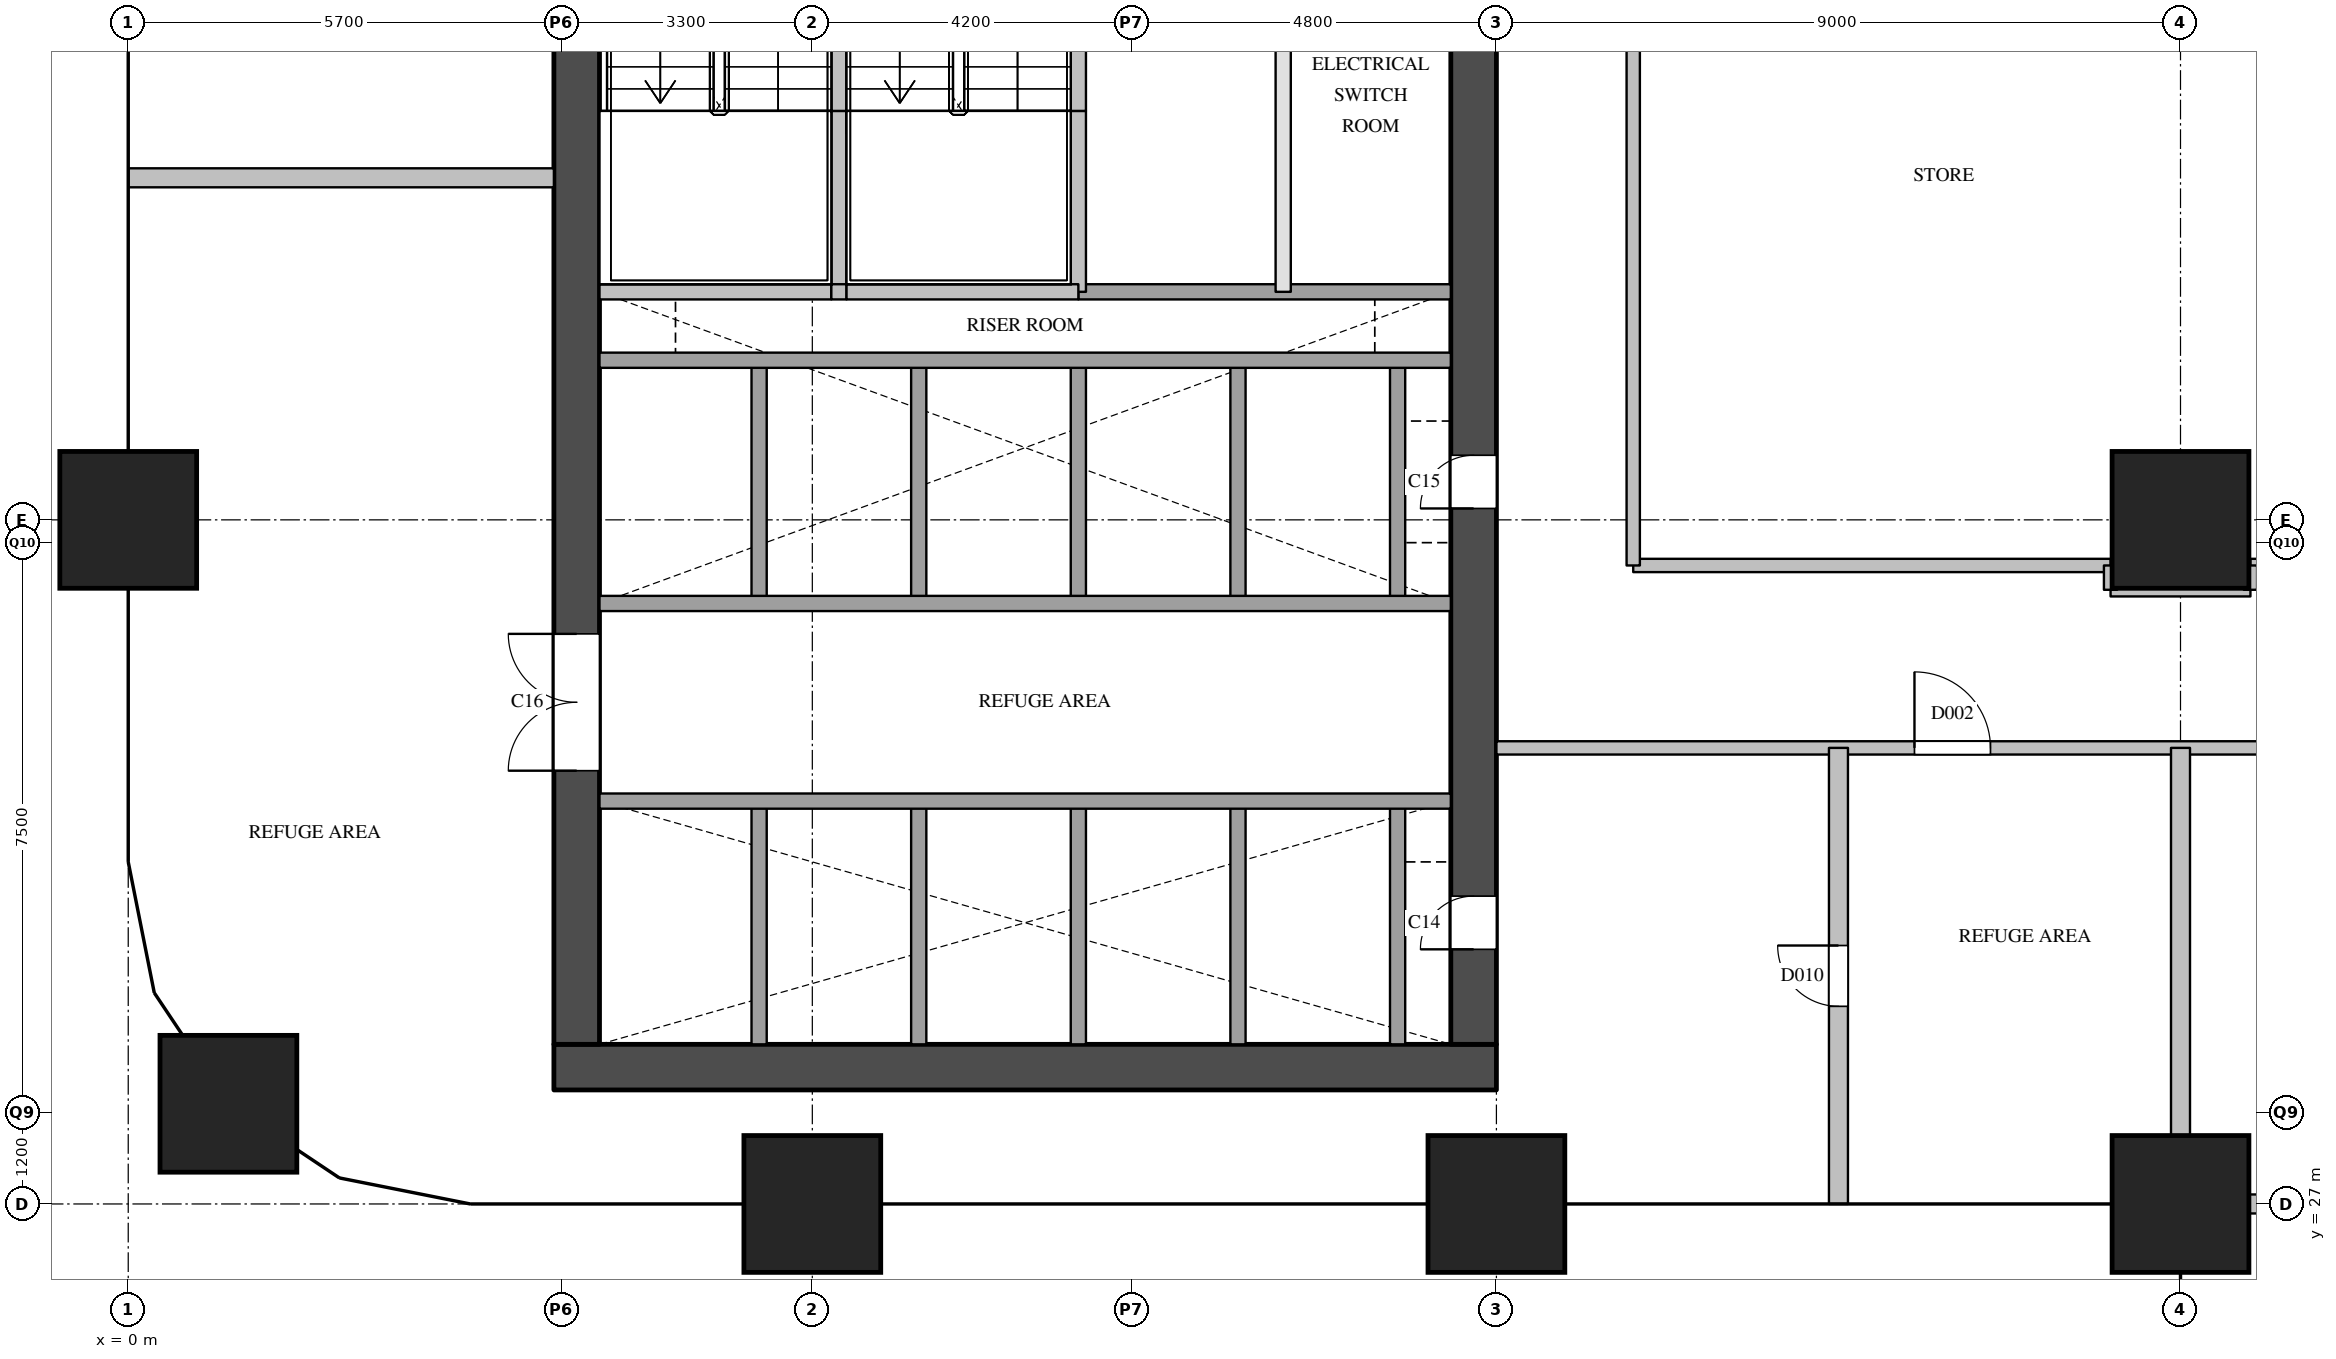
"""IFC4 building model, lengths in metres.
Left out: names, types, materials, properties, quantities, classifications, styles, units other than length and angle.
Written with IfcOpenShell. Run it as: python <this file> out.ifc"""

import sys

from ifc_helpers import new_model, si_unit, direction, frame, frame_2d, origin, origin_2d, place, context, subcontext, project, spatial, rectangle, extrude, element, fill, save


model = new_model("IFC4")
c1 = context("Model", 3, precision=1e-05, world=origin(), true_north=direction((0.0, 1.0)))
c2 = subcontext(c1, "Body", "Model", "MODEL_VIEW")
j1 = project(units=[si_unit("LENGTHUNIT", "METRE"), si_unit("PLANEANGLEUNIT", "RADIAN")], contexts=[c1])
p1 = place(None, origin())
s1 = spatial("IfcSite", under=j1, at=p1, CompositionType="ELEMENT")
p2 = place(p1, origin())
s2 = spatial("IfcBuilding", under=s1, at=p2, CompositionType="ELEMENT")
p3 = place(p2, frame((0.0, 0.0, 123.4)))
s3 = spatial("IfcBuildingStorey", under=s2, at=p3, CompositionType="ELEMENT", Elevation=123.4)
for number, where, z_axis, x_axis in (
    (1, (1.318, 28.318, 0.0), (0.0, 0.0, 1.0), (1.0, 0.0, 0.0)),
    (2, (0.0, 36.0, 0.0), (0.0, 0.0, 1.0), (1.0, 0.0, 0.0)),
    (3, (9.0, 27.0, 0.0), (0.0, 0.0, 1.0), (1.0, 0.0, 0.0)),
    (4, (18.0, 27.0, 0.0), (0.0, 0.0, 1.0), (1.0, 0.0, 0.0)),
    (5, (27.0, 27.0, 0.0), (0.0, 0.0, 1.0), (1.0, 0.0, 0.0)),
    (6, (27.0, 36.0, 0.0), (0.0, 0.0, 1.0), (1.0, 0.0, 0.0)),
):
    element("IfcColumn", number, at=place(p3, frame(where, z_axis=z_axis, x_axis=x_axis)), inside=s3, PredefinedType="COLUMN", context=c2, shape_type="SweptSolid", body=[
        extrude(rectangle(XDim=1.8, YDim=1.8, at=origin_2d()), origin(), (0.0, 0.0, 1.0), 6.0),
    ])
p4 = place(p3, frame((5.6, 28.8, 0.0), z_axis=(0.0, 0.0, 1.0), x_axis=(1.0, 0.0, 0.0)))
e7 = element("IfcWall", 7, at=p4, inside=s3, PredefinedType="SHEAR", context=c2, shape_type="SweptSolid", body=[
    extrude(rectangle(XDim=12.4, YDim=0.6, at=frame_2d((6.2, 0.0))), origin(), (0.0, 0.0, 1.0), 5.7),
])
p5 = place(p3, frame((5.9, 29.1, 0.0), z_axis=(0.0, 0.0, 1.0), x_axis=(0.0, 1.0, 0.0)))
e8 = element("IfcWall", 8, at=p5, inside=s3, PredefinedType="SHEAR", context=c2, shape_type="SweptSolid", body=[
    extrude(rectangle(XDim=20.3, YDim=0.6, at=frame_2d((10.15, 0.0))), origin(), (0.0, 0.0, 1.0), 5.7),
])
p6 = place(p5, frame((3.6, 0.0, 0.0)))
e9 = element("IfcOpeningElement", 9, at=p6, cuts=e8, PredefinedType="OPENING", context=c2, shape_type="SweptSolid", body=[
    extrude(rectangle(XDim=1.8, YDim=2.1, at=frame_2d((0.9, 1.05))), frame((0.0, 0.31, 0.0), z_axis=(0.0, -1.0, 0.0), x_axis=(1.0, 0.0, 0.0)), (0.0, 0.0, 1.0), 0.62),
])
p7 = place(p3, frame((17.7, 29.1, 0.0), z_axis=(0.0, 0.0, 1.0), x_axis=(0.0, 1.0, 0.0)))
e10 = element("IfcWall", 10, at=p7, inside=s3, PredefinedType="SHEAR", context=c2, shape_type="SweptSolid", body=[
    extrude(rectangle(XDim=20.3, YDim=0.6, at=frame_2d((10.15, 0.0))), origin(), (0.0, 0.0, 1.0), 5.7),
])
p8 = place(p7, frame((1.25, 0.0, 0.0)))
e11 = element("IfcOpeningElement", 11, at=p8, cuts=e10, PredefinedType="OPENING", context=c2, shape_type="SweptSolid", body=[
    extrude(rectangle(XDim=0.7, YDim=2.1, at=frame_2d((0.35, 1.05))), frame((0.0, 0.31, 0.0), z_axis=(0.0, -1.0, 0.0), x_axis=(1.0, 0.0, 0.0)), (0.0, 0.0, 1.0), 0.62),
])
p9 = place(p7, frame((7.05, 0.0, 0.0)))
e12 = element("IfcOpeningElement", 12, at=p9, cuts=e10, PredefinedType="OPENING", context=c2, shape_type="SweptSolid", body=[
    extrude(rectangle(XDim=0.7, YDim=2.1, at=frame_2d((0.35, 1.05))), frame((0.0, 0.31, 0.0), z_axis=(0.0, -1.0, 0.0), x_axis=(1.0, 0.0, 0.0)), (0.0, 0.0, 1.0), 0.62),
])
p10 = place(p7, frame((16.4, 0.0, 0.0)))
e13 = element("IfcOpeningElement", 13, at=p10, cuts=e10, PredefinedType="OPENING", context=c2, shape_type="SweptSolid", body=[
    extrude(rectangle(XDim=1.0, YDim=2.1, at=frame_2d((0.5, 1.05))), frame((0.0, 0.31, 0.0), z_axis=(0.0, -1.0, 0.0), x_axis=(1.0, 0.0, 0.0)), (0.0, 0.0, 1.0), 0.62),
])
p11 = place(p3, frame((8.3, 29.1, 0.0), z_axis=(0.0, 0.0, 1.0), x_axis=(0.0, 1.0, 0.0)))
e14 = element("IfcWall", 14, at=p11, inside=s3, PredefinedType="SOLIDWALL", context=c2, shape_type="SweptSolid", body=[
    extrude(rectangle(XDim=3.2, YDim=0.2, at=frame_2d((1.6, 0.0))), origin(), (0.0, 0.0, 1.0), 5.7),
])
p12 = place(p3, frame((8.3, 34.9, 0.0), z_axis=(0.0, 0.0, 1.0), x_axis=(0.0, 1.0, 0.0)))
e15 = element("IfcWall", 15, at=p12, inside=s3, PredefinedType="SOLIDWALL", context=c2, shape_type="SweptSolid", body=[
    extrude(rectangle(XDim=3.2, YDim=0.2, at=frame_2d((1.6, 0.0))), origin(), (0.0, 0.0, 1.0), 5.7),
])
p13 = place(p3, frame((9.35, 39.0, 0.0), z_axis=(0.0, 0.0, 1.0), x_axis=(0.0, 1.0, 0.0)))
e16 = element("IfcWall", 16, at=p13, inside=s3, PredefinedType="SOLIDWALL", context=c2, shape_type="SweptSolid", body=[
    extrude(rectangle(XDim=2.38, YDim=0.2, at=frame_2d((1.19, 0.0))), origin(), (0.0, 0.0, 1.0), 5.7),
])
p14 = place(p3, frame((9.35, 41.38, 0.0), z_axis=(0.0, 0.0, 1.0), x_axis=(0.0, 1.0, 0.0)))
e17 = element("IfcWall", 17, at=p14, inside=s3, PredefinedType="SOLIDWALL", context=c2, shape_type="SweptSolid", body=[
    extrude(rectangle(XDim=2.32, YDim=0.2, at=frame_2d((1.16, 0.0))), origin(), (0.0, 0.0, 1.0), 5.7),
])
p15 = place(p3, frame((10.4, 29.1, 0.0), z_axis=(0.0, 0.0, 1.0), x_axis=(0.0, 1.0, 0.0)))
e18 = element("IfcWall", 18, at=p15, inside=s3, PredefinedType="SOLIDWALL", context=c2, shape_type="SweptSolid", body=[
    extrude(rectangle(XDim=3.2, YDim=0.2, at=frame_2d((1.6, 0.0))), origin(), (0.0, 0.0, 1.0), 5.7),
])
p16 = place(p3, frame((10.4, 34.9, 0.0), z_axis=(0.0, 0.0, 1.0), x_axis=(0.0, 1.0, 0.0)))
e19 = element("IfcWall", 19, at=p16, inside=s3, PredefinedType="SOLIDWALL", context=c2, shape_type="SweptSolid", body=[
    extrude(rectangle(XDim=3.2, YDim=0.2, at=frame_2d((1.6, 0.0))), origin(), (0.0, 0.0, 1.0), 5.7),
])
p17 = place(p3, frame((12.5, 29.1, 0.0), z_axis=(0.0, 0.0, 1.0), x_axis=(0.0, 1.0, 0.0)))
e20 = element("IfcWall", 20, at=p17, inside=s3, PredefinedType="SOLIDWALL", context=c2, shape_type="SweptSolid", body=[
    extrude(rectangle(XDim=3.2, YDim=0.2, at=frame_2d((1.6, 0.0))), origin(), (0.0, 0.0, 1.0), 5.7),
])
p18 = place(p3, frame((12.5, 34.9, 0.0), z_axis=(0.0, 0.0, 1.0), x_axis=(0.0, 1.0, 0.0)))
e21 = element("IfcWall", 21, at=p18, inside=s3, PredefinedType="SOLIDWALL", context=c2, shape_type="SweptSolid", body=[
    extrude(rectangle(XDim=3.2, YDim=0.2, at=frame_2d((1.6, 0.0))), origin(), (0.0, 0.0, 1.0), 5.7),
])
p19 = place(p3, frame((12.5, 39.0, 0.0), z_axis=(0.0, 0.0, 1.0), x_axis=(0.0, 1.0, 0.0)))
e22 = element("IfcWall", 22, at=p19, inside=s3, PredefinedType="SOLIDWALL", context=c2, shape_type="SweptSolid", body=[
    extrude(rectangle(XDim=2.38, YDim=0.2, at=frame_2d((1.19, 0.0))), origin(), (0.0, 0.0, 1.0), 5.7),
])
p20 = place(p3, frame((12.5, 41.38, 0.0), z_axis=(0.0, 0.0, 1.0), x_axis=(0.0, 1.0, 0.0)))
e23 = element("IfcWall", 23, at=p20, inside=s3, PredefinedType="SOLIDWALL", context=c2, shape_type="SweptSolid", body=[
    extrude(rectangle(XDim=2.32, YDim=0.2, at=frame_2d((1.16, 0.0))), origin(), (0.0, 0.0, 1.0), 5.7),
])
p21 = place(p3, frame((14.6, 29.1, 0.0), z_axis=(0.0, 0.0, 1.0), x_axis=(0.0, 1.0, 0.0)))
e24 = element("IfcWall", 24, at=p21, inside=s3, PredefinedType="SOLIDWALL", context=c2, shape_type="SweptSolid", body=[
    extrude(rectangle(XDim=3.2, YDim=0.2, at=frame_2d((1.6, 0.0))), origin(), (0.0, 0.0, 1.0), 5.7),
])
p22 = place(p3, frame((14.6, 34.9, 0.0), z_axis=(0.0, 0.0, 1.0), x_axis=(0.0, 1.0, 0.0)))
e25 = element("IfcWall", 25, at=p22, inside=s3, PredefinedType="SOLIDWALL", context=c2, shape_type="SweptSolid", body=[
    extrude(rectangle(XDim=3.2, YDim=0.2, at=frame_2d((1.6, 0.0))), origin(), (0.0, 0.0, 1.0), 5.7),
])
p23 = place(p3, frame((15.195, 39.0, 0.0), z_axis=(0.0, 0.0, 1.0), x_axis=(0.0, 1.0, 0.0)))
e26 = element("IfcWall", 26, at=p23, inside=s3, PredefinedType="PARTITIONING", context=c2, shape_type="SweptSolid", body=[
    extrude(rectangle(XDim=6.2, YDim=0.2, at=frame_2d((3.1, 0.0))), origin(), (0.0, 0.0, 1.0), 5.7),
])
p24 = place(p3, frame((16.7, 29.1, 0.0), z_axis=(0.0, 0.0, 1.0), x_axis=(0.0, 1.0, 0.0)))
e27 = element("IfcWall", 27, at=p24, inside=s3, PredefinedType="SOLIDWALL", context=c2, shape_type="SweptSolid", body=[
    extrude(rectangle(XDim=3.2, YDim=0.2, at=frame_2d((1.6, 0.0))), origin(), (0.0, 0.0, 1.0), 5.7),
])
p25 = place(p3, frame((16.7, 34.9, 0.0), z_axis=(0.0, 0.0, 1.0), x_axis=(0.0, 1.0, 0.0)))
e28 = element("IfcWall", 28, at=p25, inside=s3, PredefinedType="SOLIDWALL", context=c2, shape_type="SweptSolid", body=[
    extrude(rectangle(XDim=3.2, YDim=0.2, at=frame_2d((1.6, 0.0))), origin(), (0.0, 0.0, 1.0), 5.7),
])
for number, where, z_axis, x_axis in (
    (29, (6.2, 32.3, 0.0), (0.0, 0.0, 1.0), (1.0, 0.0, 0.0)),
    (30, (6.2, 34.9, 0.0), (0.0, 0.0, 1.0), (1.0, 0.0, 0.0)),
    (31, (6.2, 38.1, 0.0), (0.0, 0.0, 1.0), (1.0, 0.0, 0.0)),
):
    element("IfcWall", number, at=place(p3, frame(where, z_axis=z_axis, x_axis=x_axis)), inside=s3, PredefinedType="SOLIDWALL", context=c2, shape_type="SweptSolid", body=[
        extrude(rectangle(XDim=11.2, YDim=0.2, at=frame_2d((5.6, 0.0))), origin(), (0.0, 0.0, 1.0), 5.7),
    ])
p26 = place(p3, frame((12.5, 39.0, 0.0), z_axis=(0.0, 0.0, 1.0), x_axis=(1.0, 0.0, 0.0)))
e32 = element("IfcWall", 32, at=p26, inside=s3, PredefinedType="SOLIDWALL", context=c2, shape_type="SweptSolid", body=[
    extrude(rectangle(XDim=4.9, YDim=0.2, at=frame_2d((2.45, 0.0))), origin(), (0.0, 0.0, 1.0), 5.7),
])
p27 = place(p3, frame((6.2, 39.0, 0.0), z_axis=(0.0, 0.0, 1.0), x_axis=(1.0, 0.0, 0.0)))
e33 = element("IfcWall", 33, at=p27, inside=s3, PredefinedType="SOLIDWALL", context=c2, shape_type="SweptSolid", body=[
    extrude(rectangle(XDim=3.05, YDim=0.2, at=frame_2d((1.525, 0.0))), origin(), (0.0, 0.0, 1.0), 5.7),
])
p28 = place(p3, frame((9.25, 39.0, 0.0), z_axis=(0.0, 0.0, 1.0), x_axis=(1.0, 0.0, 0.0)))
e34 = element("IfcWall", 34, at=p28, inside=s3, PredefinedType="SOLIDWALL", context=c2, shape_type="SweptSolid", body=[
    extrude(rectangle(XDim=0.2, YDim=0.2, at=frame_2d((0.1, 0.0))), origin(), (0.0, 0.0, 1.0), 5.7),
])
p29 = place(p3, frame((9.45, 39.0, 0.0), z_axis=(0.0, 0.0, 1.0), x_axis=(1.0, 0.0, 0.0)))
e35 = element("IfcWall", 35, at=p29, inside=s3, PredefinedType="SOLIDWALL", context=c2, shape_type="SweptSolid", body=[
    extrude(rectangle(XDim=3.05, YDim=0.2, at=frame_2d((1.525, 0.0))), origin(), (0.0, 0.0, 1.0), 5.7),
])
p30 = place(p3, frame((18.0, 33.0, 0.0), z_axis=(0.0, 0.0, 1.0), x_axis=(1.0, 0.0, 0.0)))
e36 = element("IfcWall", 36, at=p30, inside=s3, PredefinedType="PARTITIONING", context=c2, shape_type="SweptSolid", body=[
    extrude(rectangle(XDim=15.0, YDim=0.175, at=frame_2d((7.5, 0.0))), origin(), (0.0, 0.0, 1.0), 5.7),
])
p31 = place(p30, frame((5.5, 0.0, 0.0)))
e37 = element("IfcOpeningElement", 37, at=p31, cuts=e36, PredefinedType="OPENING", context=c2, shape_type="SweptSolid", body=[
    extrude(rectangle(XDim=1.0, YDim=2.1, at=frame_2d((0.5, 1.05))), frame((0.0, 0.097, 0.0), z_axis=(0.0, -1.0, 0.0), x_axis=(1.0, 0.0, 0.0)), (0.0, 0.0, 1.0), 0.195),
])
p32 = place(p3, frame((26.08, 35.08, 0.0), z_axis=(0.0, 0.0, 1.0), x_axis=(1.0, 0.0, 0.0)))
e38 = element("IfcWall", 38, at=p32, inside=s3, PredefinedType="PARTITIONING", context=c2, shape_type="SweptSolid", body=[
    extrude(rectangle(XDim=1.84, YDim=0.175, at=frame_2d((0.92, 0.0))), origin(), (0.0, 0.0, 1.0), 5.7),
])
for number, where, z_axis, x_axis in (
    (39, (19.8, 35.4, 0.0), (0.0, 0.0, 1.0), (1.0, 0.0, 0.0)),
    (40, (27.92, 35.4, 0.0), (0.0, 0.0, 1.0), (1.0, 0.0, 0.0)),
):
    element("IfcWall", number, at=place(p3, frame(where, z_axis=z_axis, x_axis=x_axis)), inside=s3, PredefinedType="PARTITIONING", context=c2, shape_type="SweptSolid", body=[
        extrude(rectangle(XDim=6.28, YDim=0.175, at=frame_2d((3.14, 0.0))), origin(), (0.0, 0.0, 1.0), 5.7),
    ])
p33 = place(p3, frame((19.8, 35.4, 0.0), z_axis=(0.0, 0.0, 1.0), x_axis=(0.0, 1.0, 0.0)))
e41 = element("IfcWall", 41, at=p33, inside=s3, PredefinedType="PARTITIONING", context=c2, shape_type="SweptSolid", body=[
    extrude(rectangle(XDim=10.2, YDim=0.175, at=frame_2d((5.1, 0.0))), origin(), (0.0, 0.0, 1.0), 5.7),
])
for number, where, z_axis, x_axis in (
    (42, (26.08, 35.08, 0.0), (0.0, 0.0, 1.0), (0.0, 1.0, 0.0)),
    (43, (27.92, 35.08, 0.0), (0.0, 0.0, 1.0), (0.0, 1.0, 0.0)),
):
    element("IfcWall", number, at=place(p3, frame(where, z_axis=z_axis, x_axis=x_axis)), inside=s3, PredefinedType="PARTITIONING", context=c2, shape_type="SweptSolid", body=[
        extrude(rectangle(XDim=0.32, YDim=0.175, at=frame_2d((0.16, 0.0))), origin(), (0.0, 0.0, 1.0), 5.7),
    ])
p34 = place(p3, frame((26.875, 27.0, 0.0), z_axis=(0.0, 0.0, 1.0), x_axis=(1.0, 0.0, 0.0)))
e44 = element("IfcWall", 44, at=p34, inside=s3, PredefinedType="PARTITIONING", context=c2, shape_type="SweptSolid", body=[
    extrude(rectangle(XDim=6.125, YDim=0.25, at=frame_2d((3.062, 0.0))), origin(), (0.0, 0.0, 1.0), 5.7),
])
p35 = place(p3, frame((0.0, 40.5, 0.0), z_axis=(0.0, 0.0, 1.0), x_axis=(1.0, 0.0, 0.0)))
e45 = element("IfcWall", 45, at=p35, inside=s3, PredefinedType="PARTITIONING", context=c2, shape_type="SweptSolid", body=[
    extrude(rectangle(XDim=5.6, YDim=0.25, at=frame_2d((2.8, 0.0))), origin(), (0.0, 0.0, 1.0), 5.7),
])
p36 = place(p3, frame((22.5, 27.0, 0.0), z_axis=(0.0, 0.0, 1.0), x_axis=(0.0, 1.0, 0.0)))
e46 = element("IfcWall", 46, at=p36, inside=s3, PredefinedType="PARTITIONING", context=c2, shape_type="SweptSolid", body=[
    extrude(rectangle(XDim=6.0, YDim=0.25, at=frame_2d((3.0, 0.0))), origin(), (0.0, 0.0, 1.0), 5.7),
])
p37 = place(p36, frame((2.6, 0.0, 0.0)))
e47 = element("IfcOpeningElement", 47, at=p37, cuts=e46, PredefinedType="OPENING", context=c2, shape_type="SweptSolid", body=[
    extrude(rectangle(XDim=0.8, YDim=2.1, at=frame_2d((0.4, 1.05))), frame((0.0, 0.135, 0.0), z_axis=(0.0, -1.0, 0.0), x_axis=(1.0, 0.0, 0.0)), (0.0, 0.0, 1.0), 0.27),
])
p38 = place(p3, frame((27.0, 27.125, 0.0), z_axis=(0.0, 0.0, 1.0), x_axis=(0.0, 1.0, 0.0)))
e48 = element("IfcWall", 48, at=p38, inside=s3, PredefinedType="PARTITIONING", context=c2, shape_type="SweptSolid", body=[
    extrude(rectangle(XDim=5.875, YDim=0.25, at=frame_2d((2.938, 0.0))), origin(), (0.0, 0.0, 1.0), 5.7),
])
p39 = place(p8, origin())
e49 = element("IfcDoor", 49, at=p39, inside=s3, OperationType="SINGLE_SWING_LEFT", PredefinedType="DOOR", context=c2, shape_type="SweptSolid", body=[
    extrude(rectangle(XDim=0.7, YDim=2.1, at=frame_2d((0.35, 1.05))), frame((0.0, 0.025, 0.0), z_axis=(0.0, -1.0, 0.0), x_axis=(1.0, 0.0, 0.0)), (0.0, 0.0, 1.0), 0.05),
])
fill(e11, e49)
p40 = place(p9, origin())
e50 = element("IfcDoor", 50, at=p40, inside=s3, OperationType="SINGLE_SWING_LEFT", PredefinedType="DOOR", context=c2, shape_type="SweptSolid", body=[
    extrude(rectangle(XDim=0.7, YDim=2.1, at=frame_2d((0.35, 1.05))), frame((0.0, 0.025, 0.0), z_axis=(0.0, -1.0, 0.0), x_axis=(1.0, 0.0, 0.0)), (0.0, 0.0, 1.0), 0.05),
])
fill(e12, e50)
p41 = place(p6, origin())
e51 = element("IfcDoor", 51, at=p41, inside=s3, OperationType="DOUBLE_DOOR_SINGLE_SWING", PredefinedType="DOOR", context=c2, shape_type="SweptSolid", body=[
    extrude(rectangle(XDim=1.8, YDim=2.1, at=frame_2d((0.9, 1.05))), frame((0.0, 0.025, 0.0), z_axis=(0.0, -1.0, 0.0), x_axis=(1.0, 0.0, 0.0)), (0.0, 0.0, 1.0), 0.05),
])
fill(e9, e51)
p42 = place(p31, origin())
e52 = element("IfcDoor", 52, at=p42, inside=s3, OperationType="SINGLE_SWING_LEFT", PredefinedType="DOOR", context=c2, shape_type="SweptSolid", body=[
    extrude(rectangle(XDim=1.0, YDim=2.1, at=frame_2d((0.5, 1.05))), frame((0.0, 0.025, 0.0), z_axis=(0.0, -1.0, 0.0), x_axis=(1.0, 0.0, 0.0)), (0.0, 0.0, 1.0), 0.05),
])
fill(e37, e52)
p43 = place(p37, origin())
e53 = element("IfcDoor", 53, at=p43, inside=s3, OperationType="SINGLE_SWING_RIGHT", PredefinedType="DOOR", context=c2, shape_type="SweptSolid", body=[
    extrude(rectangle(XDim=0.8, YDim=2.1, at=frame_2d((0.4, 1.05))), frame((0.0, 0.025, 0.0), z_axis=(0.0, -1.0, 0.0), x_axis=(1.0, 0.0, 0.0)), (0.0, 0.0, 1.0), 0.05),
])
fill(e47, e53)
save(model, sys.argv[1])
